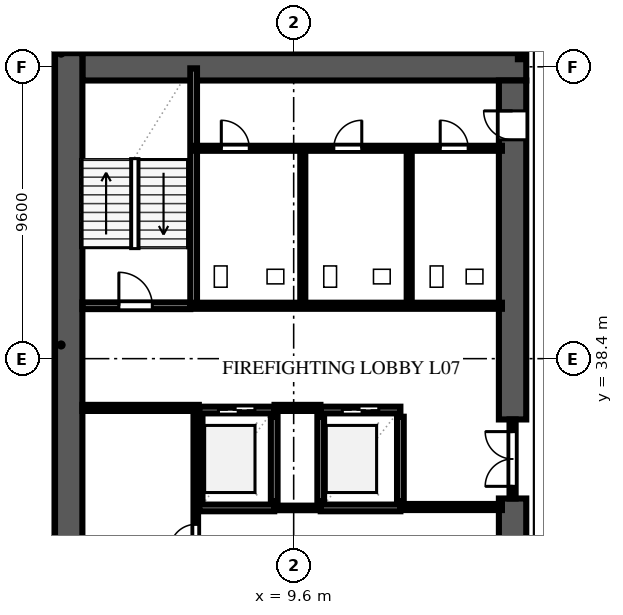
"""IFC4 building model, lengths in metres.
Left out: names, types, materials, properties, quantities, classifications, styles, units other than length and angle.
Written with IfcOpenShell. Run it as: python <this file> out.ifc"""

import sys

from ifc_helpers import new_model, si_unit, direction, frame, frame_2d, origin, place, context, subcontext, project, spatial, rectangle, extrude, element, fill, save


model = new_model("IFC4")
c1 = context("Model", 3, precision=1e-05, world=origin(), true_north=direction((0.0, 1.0)))
c2 = subcontext(c1, "Body", "Model", "MODEL_VIEW")
j1 = project(units=[si_unit("LENGTHUNIT", "METRE"), si_unit("PLANEANGLEUNIT", "RADIAN")], contexts=[c1])
p1 = place(None, origin())
s1 = spatial("IfcSite", under=j1, at=p1, CompositionType="ELEMENT")
p2 = place(p1, origin())
s2 = spatial("IfcBuilding", under=s1, at=p2, CompositionType="ELEMENT")
p3 = place(p2, frame((0.0, 0.0, 31.8)))
s3 = spatial("IfcBuildingStorey", under=s2, at=p3, CompositionType="ELEMENT", Elevation=31.8)
p4 = place(p3, frame((2.65, 48.0, 0.0), z_axis=(0.0, 0.0, 1.0), x_axis=(1.0, 0.0, 0.0)))
e1 = element("IfcWall", 1, at=p4, inside=s3, PredefinedType="SHEAR", context=c2, shape_type="SweptSolid", body=[
    extrude(rectangle(XDim=14.6, YDim=0.9, at=frame_2d((7.3, 0.0))), origin(), (0.0, 0.0, 1.0), 3.54),
])
p5 = place(p3, frame((2.2, 9.15, 0.0), z_axis=(0.0, 0.0, 1.0), x_axis=(0.0, 1.0, 0.0)))
e2 = element("IfcWall", 2, at=p5, inside=s3, PredefinedType="SHEAR", context=c2, shape_type="SweptSolid", body=[
    extrude(rectangle(XDim=39.3, YDim=0.9, at=frame_2d((19.65, 0.0))), origin(), (0.0, 0.0, 1.0), 3.54),
])
p6 = place(p3, frame((16.8, 26.0, 0.0), z_axis=(0.0, 0.0, 1.0), x_axis=(0.0, 1.0, 0.0)))
e3 = element("IfcWall", 3, at=p6, inside=s3, PredefinedType="SHEAR", context=c2, shape_type="SweptSolid", body=[
    extrude(rectangle(XDim=7.8, YDim=0.9, at=frame_2d((3.9, 0.0))), origin(), (0.0, 0.0, 1.0), 3.54),
])
p7 = place(p3, frame((16.8, 36.4, 0.0), z_axis=(0.0, 0.0, 1.0), x_axis=(0.0, 1.0, 0.0)))
e4 = element("IfcWall", 4, at=p7, inside=s3, PredefinedType="SHEAR", context=c2, shape_type="SweptSolid", body=[
    extrude(rectangle(XDim=11.15, YDim=0.9, at=frame_2d((5.575, 0.0))), origin(), (0.0, 0.0, 1.0), 3.54),
])
p8 = place(p7, frame((9.2, 0.0, 0.0)))
e5 = element("IfcOpeningElement", 5, at=p8, cuts=e4, PredefinedType="OPENING", context=c2, shape_type="SweptSolid", body=[
    extrude(rectangle(XDim=0.95, YDim=2.15, at=frame_2d((0.475, 1.075))), frame((0.0, 0.462, 0.0), z_axis=(0.0, -1.0, 0.0), x_axis=(1.0, 0.0, 0.0)), (0.0, 0.0, 1.0), 0.924),
])
p9 = place(p3, frame((2.65, 40.14, 0.0), z_axis=(0.0, 0.0, 1.0), x_axis=(1.0, 0.0, 0.0)))
e6 = element("IfcWall", 6, at=p9, inside=s3, PredefinedType="SOLIDWALL", context=c2, shape_type="SweptSolid", body=[
    extrude(rectangle(XDim=3.55, YDim=0.22, at=frame_2d((1.775, 0.0))), origin(), (0.0, 0.0, 1.0), 3.54),
])
p10 = place(p9, frame((1.2, 0.0, 0.0)))
e7 = element("IfcOpeningElement", 7, at=p10, cuts=e6, PredefinedType="OPENING", context=c2, shape_type="SweptSolid", body=[
    extrude(rectangle(XDim=1.1, YDim=2.2, at=frame_2d((0.55, 1.1))), frame((0.0, 0.122, 0.0), z_axis=(0.0, -1.0, 0.0), x_axis=(1.0, 0.0, 0.0)), (0.0, 0.0, 1.0), 0.244),
])
p11 = place(p3, frame((6.31, 40.14, 0.0), z_axis=(0.0, 0.0, 1.0), x_axis=(0.0, 1.0, 0.0)))
e8 = element("IfcWall", 8, at=p11, inside=s3, PredefinedType="SOLIDWALL", context=c2, shape_type="SweptSolid", body=[
    extrude(rectangle(XDim=7.81, YDim=0.22, at=frame_2d((3.905, 0.0))), origin(), (0.0, 0.0, 1.0), 3.54),
])
for number, where, z_axis, x_axis in (
    (9, (6.49, 33.71, 0.0), (0.0, 0.0, 1.0), (0.0, 1.0, 0.0)),
    (10, (8.96, 33.71, 0.0), (0.0, 0.0, 1.0), (0.0, 1.0, 0.0)),
):
    element("IfcWall", number, at=place(p3, frame(where, z_axis=z_axis, x_axis=x_axis)), inside=s3, PredefinedType="SOLIDWALL", context=c2, shape_type="SweptSolid", body=[
        extrude(rectangle(XDim=2.78, YDim=0.22, at=frame_2d((1.39, 0.0))), origin(), (0.0, 0.0, 1.0), 3.54),
    ])
p12 = place(p3, frame((6.49, 33.49, 0.0), z_axis=(0.0, 0.0, 1.0), x_axis=(1.0, 0.0, 0.0)))
e11 = element("IfcWall", 11, at=p12, inside=s3, PredefinedType="SOLIDWALL", context=c2, shape_type="SweptSolid", body=[
    extrude(rectangle(XDim=2.47, YDim=0.22, at=frame_2d((1.235, 0.0))), origin(), (0.0, 0.0, 1.0), 3.54),
])
p13 = place(p3, frame((6.49, 36.71, 0.0), z_axis=(0.0, 0.0, 1.0), x_axis=(1.0, 0.0, 0.0)))
e12 = element("IfcWall", 12, at=p13, inside=s3, PredefinedType="SOLIDWALL", context=c2, shape_type="SweptSolid", body=[
    extrude(rectangle(XDim=2.47, YDim=0.22, at=frame_2d((1.235, 0.0))), origin(), (0.0, 0.0, 1.0), 3.54),
])
p14 = place(p13, frame((0.635, 0.0, 0.0)))
e13 = element("IfcOpeningElement", 13, at=p14, cuts=e12, PredefinedType="OPENING", context=c2, shape_type="SweptSolid", body=[
    extrude(rectangle(XDim=1.2, YDim=2.2, at=frame_2d((0.6, 1.1))), frame((0.0, 0.122, 0.0), z_axis=(0.0, -1.0, 0.0), x_axis=(1.0, 0.0, 0.0)), (0.0, 0.0, 1.0), 0.244),
])
for number, where, z_axis, x_axis in (
    (14, (10.49, 33.71, 0.0), (0.0, 0.0, 1.0), (0.0, 1.0, 0.0)),
    (15, (13.11, 33.71, 0.0), (0.0, 0.0, 1.0), (0.0, 1.0, 0.0)),
):
    element("IfcWall", number, at=place(p3, frame(where, z_axis=z_axis, x_axis=x_axis)), inside=s3, PredefinedType="SOLIDWALL", context=c2, shape_type="SweptSolid", body=[
        extrude(rectangle(XDim=2.78, YDim=0.22, at=frame_2d((1.39, 0.0))), origin(), (0.0, 0.0, 1.0), 3.54),
    ])
p15 = place(p3, frame((10.49, 33.49, 0.0), z_axis=(0.0, 0.0, 1.0), x_axis=(1.0, 0.0, 0.0)))
e16 = element("IfcWall", 16, at=p15, inside=s3, PredefinedType="SOLIDWALL", context=c2, shape_type="SweptSolid", body=[
    extrude(rectangle(XDim=2.62, YDim=0.22, at=frame_2d((1.31, 0.0))), origin(), (0.0, 0.0, 1.0), 3.54),
])
p16 = place(p3, frame((10.49, 36.71, 0.0), z_axis=(0.0, 0.0, 1.0), x_axis=(1.0, 0.0, 0.0)))
e17 = element("IfcWall", 17, at=p16, inside=s3, PredefinedType="SOLIDWALL", context=c2, shape_type="SweptSolid", body=[
    extrude(rectangle(XDim=2.62, YDim=0.22, at=frame_2d((1.31, 0.0))), origin(), (0.0, 0.0, 1.0), 3.54),
])
p17 = place(p16, frame((0.71, 0.0, 0.0)))
e18 = element("IfcOpeningElement", 18, at=p17, cuts=e17, PredefinedType="OPENING", context=c2, shape_type="SweptSolid", body=[
    extrude(rectangle(XDim=1.2, YDim=2.2, at=frame_2d((0.6, 1.1))), frame((0.0, 0.122, 0.0), z_axis=(0.0, -1.0, 0.0), x_axis=(1.0, 0.0, 0.0)), (0.0, 0.0, 1.0), 0.244),
])
p18 = place(p3, frame((2.65, 36.78, 0.0), z_axis=(0.0, 0.0, 1.0), x_axis=(1.0, 0.0, 0.0)))
e19 = element("IfcWall", 19, at=p18, inside=s3, PredefinedType="SOLIDWALL", context=c2, shape_type="SweptSolid", body=[
    extrude(rectangle(XDim=3.83, YDim=0.2, at=frame_2d((1.915, 0.0))), origin(), (0.0, 0.0, 1.0), 3.54),
])
p19 = place(p3, frame((8.97, 36.78, 0.0), z_axis=(0.0, 0.0, 1.0), x_axis=(1.0, 0.0, 0.0)))
e20 = element("IfcWall", 20, at=p19, inside=s3, PredefinedType="SOLIDWALL", context=c2, shape_type="SweptSolid", body=[
    extrude(rectangle(XDim=1.51, YDim=0.2, at=frame_2d((0.755, 0.0))), origin(), (0.0, 0.0, 1.0), 3.54),
])
p20 = place(p3, frame((13.12, 33.52, 0.0), z_axis=(0.0, 0.0, 1.0), x_axis=(1.0, 0.0, 0.0)))
e21 = element("IfcWall", 21, at=p20, inside=s3, PredefinedType="SOLIDWALL", context=c2, shape_type="SweptSolid", body=[
    extrude(rectangle(XDim=3.33, YDim=0.2, at=frame_2d((1.665, 0.0))), origin(), (0.0, 0.0, 1.0), 3.54),
])
p21 = place(p3, frame((6.32, 40.14, 0.0), z_axis=(0.0, 0.0, 1.0), x_axis=(1.0, 0.0, 0.0)))
e22 = element("IfcWall", 22, at=p21, inside=s3, PredefinedType="SOLIDWALL", context=c2, shape_type="SweptSolid", body=[
    extrude(rectangle(XDim=10.13, YDim=0.2, at=frame_2d((5.065, 0.0))), origin(), (0.0, 0.0, 1.0), 3.54),
])
p22 = place(p3, frame((16.8, 33.8, 0.0), z_axis=(0.0, 0.0, 1.0), x_axis=(0.0, 1.0, 0.0)))
e23 = element("IfcWall", 23, at=p22, inside=s3, PredefinedType="SOLIDWALL", context=c2, shape_type="SweptSolid", body=[
    extrude(rectangle(XDim=2.6, YDim=0.2, at=frame_2d((1.3, 0.0))), origin(), (0.0, 0.0, 1.0), 3.54),
])
p23 = place(p22, frame((0.4, 0.0, 0.0)))
e24 = element("IfcOpeningElement", 24, at=p23, cuts=e23, PredefinedType="OPENING", context=c2, shape_type="SweptSolid", body=[
    extrude(rectangle(XDim=1.8, YDim=2.2, at=frame_2d((0.9, 1.1))), frame((0.0, 0.112, 0.0), z_axis=(0.0, -1.0, 0.0), x_axis=(1.0, 0.0, 0.0)), (0.0, 0.0, 1.0), 0.224),
])
p24 = place(p3, frame((8.965, 33.49, 0.0), z_axis=(0.0, 0.0, 1.0), x_axis=(1.0, 0.0, 0.0)))
e25 = element("IfcWall", 25, at=p24, inside=s3, PredefinedType="PARTITIONING", context=c2, shape_type="SweptSolid", body=[
    extrude(rectangle(XDim=1.52, YDim=0.15, at=frame_2d((0.76, 0.0))), origin(), (0.0, 0.0, 1.0), 3.54),
])
p25 = place(p3, frame((6.38, 17.8, 0.0), z_axis=(0.0, 0.0, 1.0), x_axis=(0.0, 1.0, 0.0)))
e26 = element("IfcWall", 26, at=p25, inside=s3, PredefinedType="PARTITIONING", context=c2, shape_type="SweptSolid", body=[
    extrude(rectangle(XDim=18.98, YDim=0.15, at=frame_2d((9.49, 0.0))), origin(), (0.0, 0.0, 1.0), 3.54),
])
p26 = place(p25, frame((14.3, 0.0, 0.0)))
e27 = element("IfcOpeningElement", 27, at=p26, cuts=e26, PredefinedType="OPENING", context=c2, shape_type="SweptSolid", body=[
    extrude(rectangle(XDim=0.85, YDim=2.1, at=frame_2d((0.425, 1.05))), frame((0.0, 0.087, 0.0), z_axis=(0.0, -1.0, 0.0), x_axis=(1.0, 0.0, 0.0)), (0.0, 0.0, 1.0), 0.174),
])
p27 = place(p3, frame((6.32, 45.32, 0.0), z_axis=(0.0, 0.0, 1.0), x_axis=(1.0, 0.0, 0.0)))
e28 = element("IfcWall", 28, at=p27, inside=s3, PredefinedType="PLUMBINGWALL", context=c2, shape_type="SweptSolid", body=[
    extrude(rectangle(XDim=10.13, YDim=0.165, at=frame_2d((5.065, 0.0))), origin(), (0.0, 0.0, 1.0), 3.54),
])
p28 = place(p27, frame((0.9, 0.0, 0.0)))
e29 = element("IfcOpeningElement", 29, at=p28, cuts=e28, PredefinedType="OPENING", context=c2, shape_type="SweptSolid", body=[
    extrude(rectangle(XDim=0.92, YDim=2.15, at=frame_2d((0.46, 1.075))), frame((0.0, 0.094, 0.0), z_axis=(0.0, -1.0, 0.0), x_axis=(1.0, 0.0, 0.0)), (0.0, 0.0, 1.0), 0.189),
])
p29 = place(p27, frame((4.6, 0.0, 0.0)))
e30 = element("IfcOpeningElement", 30, at=p29, cuts=e28, PredefinedType="OPENING", context=c2, shape_type="SweptSolid", body=[
    extrude(rectangle(XDim=0.92, YDim=2.15, at=frame_2d((0.46, 1.075))), frame((0.0, 0.094, 0.0), z_axis=(0.0, -1.0, 0.0), x_axis=(1.0, 0.0, 0.0)), (0.0, 0.0, 1.0), 0.189),
])
p30 = place(p27, frame((8.1, 0.0, 0.0)))
e31 = element("IfcOpeningElement", 31, at=p30, cuts=e28, PredefinedType="OPENING", context=c2, shape_type="SweptSolid", body=[
    extrude(rectangle(XDim=0.92, YDim=2.15, at=frame_2d((0.46, 1.075))), frame((0.0, 0.094, 0.0), z_axis=(0.0, -1.0, 0.0), x_axis=(1.0, 0.0, 0.0)), (0.0, 0.0, 1.0), 0.189),
])
for number, where, z_axis, x_axis in (
    (32, (9.9, 40.4, 0.0), (0.0, 0.0, 1.0), (0.0, 1.0, 0.0)),
    (33, (13.4, 40.4, 0.0), (0.0, 0.0, 1.0), (0.0, 1.0, 0.0)),
):
    element("IfcWall", number, at=place(p3, frame(where, z_axis=z_axis, x_axis=x_axis)), inside=s3, PredefinedType="PLUMBINGWALL", context=c2, shape_type="SweptSolid", body=[
        extrude(rectangle(XDim=4.92, YDim=0.165, at=frame_2d((2.46, 0.0))), origin(), (0.0, 0.0, 1.0), 3.54),
    ])
p31 = place(p3, frame((0.85, 48.0, 0.0), z_axis=(0.0, 0.0, 1.0), x_axis=(1.0, 0.0, 0.0)))
e34 = element("IfcWall", 34, at=p31, inside=s3, PredefinedType="SOLIDWALL", context=c2, shape_type="SweptSolid", body=[
    extrude(rectangle(XDim=0.895, YDim=0.2, at=frame_2d((0.448, 0.0))), origin(), (0.0, 0.0, 1.0), 3.54),
])
p32 = place(p3, frame((17.05, 48.25, 0.0), z_axis=(0.0, 0.0, 1.0), x_axis=(0.0, 1.0, 0.0)))
e35 = element("IfcWall", 35, at=p32, inside=s3, PredefinedType="PARTITIONING", context=c2, shape_type="SweptSolid", body=[
    extrude(rectangle(XDim=18.73, YDim=0.15, at=frame_2d((9.365, 0.0))), origin(), (0.0, 0.0, 1.0), 3.54),
])
p33 = place(p32, frame((3.4, 0.0, 0.0)))
e36 = element("IfcOpeningElement", 36, at=p33, cuts=e35, PredefinedType="OPENING", context=c2, shape_type="SweptSolid", body=[
    extrude(rectangle(XDim=0.95, YDim=2.15, at=frame_2d((0.475, 1.075))), frame((0.0, 0.087, 0.0), z_axis=(0.0, -1.0, 0.0), x_axis=(1.0, 0.0, 0.0)), (0.0, 0.0, 1.0), 0.174),
])
p34 = place(p10, origin())
e37 = element("IfcDoor", 37, at=p34, inside=s3, OperationType="SINGLE_SWING_LEFT", PredefinedType="DOOR", context=c2, shape_type="SweptSolid", body=[
    extrude(rectangle(XDim=1.1, YDim=2.2, at=frame_2d((0.55, 1.1))), frame((0.0, 0.025, 0.0), z_axis=(0.0, -1.0, 0.0), x_axis=(1.0, 0.0, 0.0)), (0.0, 0.0, 1.0), 0.05),
])
fill(e7, e37)
p35 = place(p14, origin())
e38 = element("IfcDoor", 38, at=p35, inside=s3, OperationType="DOUBLE_DOOR_SLIDING", PredefinedType="DOOR", context=c2, shape_type="SweptSolid", body=[
    extrude(rectangle(XDim=1.2, YDim=2.2, at=frame_2d((0.6, 1.1))), frame((0.0, 0.025, 0.0), z_axis=(0.0, -1.0, 0.0), x_axis=(1.0, 0.0, 0.0)), (0.0, 0.0, 1.0), 0.05),
])
fill(e13, e38)
p36 = place(p17, origin())
e39 = element("IfcDoor", 39, at=p36, inside=s3, OperationType="DOUBLE_DOOR_SLIDING", PredefinedType="DOOR", context=c2, shape_type="SweptSolid", body=[
    extrude(rectangle(XDim=1.2, YDim=2.2, at=frame_2d((0.6, 1.1))), frame((0.0, 0.025, 0.0), z_axis=(0.0, -1.0, 0.0), x_axis=(1.0, 0.0, 0.0)), (0.0, 0.0, 1.0), 0.05),
])
fill(e18, e39)
p37 = place(p8, origin())
e40 = element("IfcDoor", 40, at=p37, inside=s3, OperationType="SINGLE_SWING_RIGHT", PredefinedType="DOOR", context=c2, shape_type="SweptSolid", body=[
    extrude(rectangle(XDim=0.95, YDim=2.15, at=frame_2d((0.475, 1.075))), frame((0.0, 0.025, 0.0), z_axis=(0.0, -1.0, 0.0), x_axis=(1.0, 0.0, 0.0)), (0.0, 0.0, 1.0), 0.05),
])
fill(e5, e40)
p38 = place(p23, origin())
e41 = element("IfcDoor", 41, at=p38, inside=s3, OperationType="DOUBLE_DOOR_SINGLE_SWING", PredefinedType="DOOR", context=c2, shape_type="SweptSolid", body=[
    extrude(rectangle(XDim=1.8, YDim=2.2, at=frame_2d((0.9, 1.1))), frame((0.0, 0.025, 0.0), z_axis=(0.0, -1.0, 0.0), x_axis=(1.0, 0.0, 0.0)), (0.0, 0.0, 1.0), 0.05),
])
fill(e24, e41)
p39 = place(p26, origin())
e42 = element("IfcDoor", 42, at=p39, inside=s3, OperationType="SINGLE_SWING_LEFT", PredefinedType="DOOR", context=c2, shape_type="SweptSolid", body=[
    extrude(rectangle(XDim=0.85, YDim=2.1, at=frame_2d((0.425, 1.05))), frame((0.0, 0.025, 0.0), z_axis=(0.0, -1.0, 0.0), x_axis=(1.0, 0.0, 0.0)), (0.0, 0.0, 1.0), 0.05),
])
fill(e27, e42)
p40 = place(p28, origin())
e43 = element("IfcDoor", 43, at=p40, inside=s3, OperationType="SINGLE_SWING_LEFT", PredefinedType="DOOR", context=c2, shape_type="SweptSolid", body=[
    extrude(rectangle(XDim=0.92, YDim=2.15, at=frame_2d((0.46, 1.075))), frame((0.0, 0.025, 0.0), z_axis=(0.0, -1.0, 0.0), x_axis=(1.0, 0.0, 0.0)), (0.0, 0.0, 1.0), 0.05),
])
fill(e29, e43)
p41 = place(p29, origin())
e44 = element("IfcDoor", 44, at=p41, inside=s3, OperationType="SINGLE_SWING_RIGHT", PredefinedType="DOOR", context=c2, shape_type="SweptSolid", body=[
    extrude(rectangle(XDim=0.92, YDim=2.15, at=frame_2d((0.46, 1.075))), frame((0.0, 0.025, 0.0), z_axis=(0.0, -1.0, 0.0), x_axis=(1.0, 0.0, 0.0)), (0.0, 0.0, 1.0), 0.05),
])
fill(e30, e44)
p42 = place(p30, origin())
e45 = element("IfcDoor", 45, at=p42, inside=s3, OperationType="SINGLE_SWING_LEFT", PredefinedType="DOOR", context=c2, shape_type="SweptSolid", body=[
    extrude(rectangle(XDim=0.92, YDim=2.15, at=frame_2d((0.46, 1.075))), frame((0.0, 0.025, 0.0), z_axis=(0.0, -1.0, 0.0), x_axis=(1.0, 0.0, 0.0)), (0.0, 0.0, 1.0), 0.05),
])
fill(e31, e45)
save(model, sys.argv[1])
